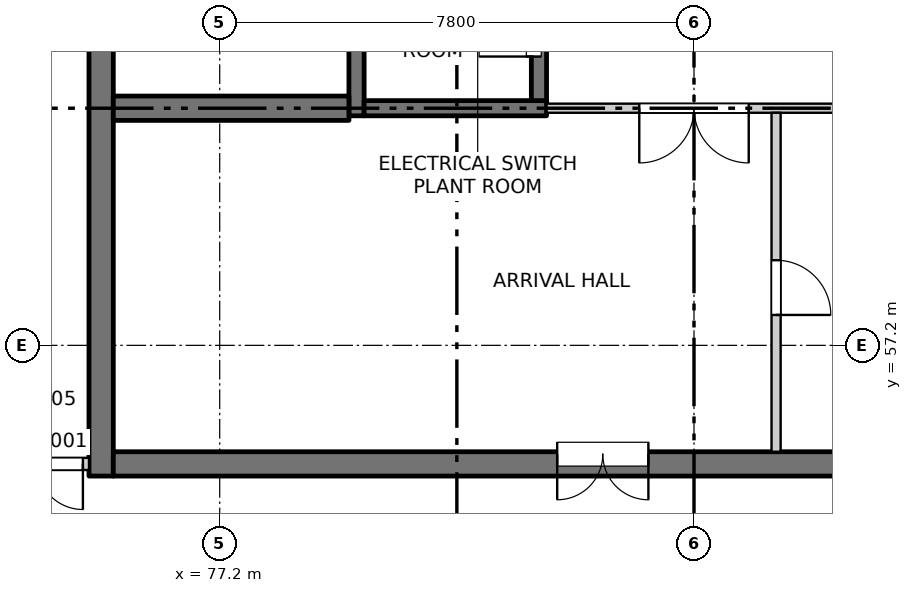
"""IFC4 building model, lengths in metres.
Left out: names, types, materials, properties, quantities, classifications, styles, units other than length and angle.
Written with IfcOpenShell. Run it as: python <this file> out.ifc"""

import sys

from ifc_helpers import new_model, si_unit, direction, frame, frame_2d, origin, place, context, subcontext, project, spatial, rectangle, extrude, element, fill, save


model = new_model("IFC4")
c1 = context("Model", 3, precision=1e-05, world=origin(), true_north=direction((0.0, 1.0)))
c2 = subcontext(c1, "Body", "Model", "MODEL_VIEW")
j1 = project(units=[si_unit("LENGTHUNIT", "METRE"), si_unit("PLANEANGLEUNIT", "RADIAN")], contexts=[c1])
p1 = place(None, origin())
s1 = spatial("IfcSite", under=j1, at=p1, CompositionType="ELEMENT")
p2 = place(p1, origin())
s2 = spatial("IfcBuilding", under=s1, at=p2, CompositionType="ELEMENT")
p3 = place(p2, frame((0.0, 0.0, 241.5)))
s3 = spatial("IfcBuildingStorey", under=s2, at=p3, CompositionType="ELEMENT", Elevation=241.5)
p4 = place(p3, frame((75.25, 55.05, -0.3), z_axis=(0.0, 0.0, 1.0), x_axis=(0.0, 1.0, 0.0)))
e1 = element("IfcWall", 1, at=p4, inside=s3, PredefinedType="SOLIDWALL", context=c2, shape_type="SweptSolid", body=[
    extrude(rectangle(XDim=22.25, YDim=0.4, at=frame_2d((11.125, 0.0))), origin(), (0.0, 0.0, 1.0), 4.5),
])
p5 = place(p4, frame((7.4, 0.0, 0.3)))
e2 = element("IfcOpeningElement", 2, at=p5, cuts=e1, PredefinedType="OPENING", context=c2, shape_type="SweptSolid", body=[
    extrude(rectangle(XDim=0.9, YDim=2.1, at=frame_2d((0.45, 1.05))), frame((0.0, 0.21, 0.0), z_axis=(0.0, -1.0, 0.0), x_axis=(1.0, 0.0, 0.0)), (0.0, 0.0, 1.0), 0.42),
])
p6 = place(p4, frame((10.7, 0.0, 0.3)))
e3 = element("IfcOpeningElement", 3, at=p6, cuts=e1, PredefinedType="OPENING", context=c2, shape_type="SweptSolid", body=[
    extrude(rectangle(XDim=0.9, YDim=2.1, at=frame_2d((0.45, 1.05))), frame((0.0, 0.21, 0.0), z_axis=(0.0, -1.0, 0.0), x_axis=(1.0, 0.0, 0.0)), (0.0, 0.0, 1.0), 0.42),
])
p7 = place(p4, frame((15.2, 0.0, 0.3)))
e4 = element("IfcOpeningElement", 4, at=p7, cuts=e1, PredefinedType="OPENING", context=c2, shape_type="SweptSolid", body=[
    extrude(rectangle(XDim=0.9, YDim=2.1, at=frame_2d((0.45, 1.05))), frame((0.0, 0.21, 0.0), z_axis=(0.0, -1.0, 0.0), x_axis=(1.0, 0.0, 0.0)), (0.0, 0.0, 1.0), 0.42),
])
p8 = place(p4, frame((20.0, 0.0, 0.3)))
e5 = element("IfcOpeningElement", 5, at=p8, cuts=e1, PredefinedType="OPENING", context=c2, shape_type="SweptSolid", body=[
    extrude(rectangle(XDim=0.9, YDim=2.1, at=frame_2d((0.45, 1.05))), frame((0.0, 0.21, 0.0), z_axis=(0.0, -1.0, 0.0), x_axis=(1.0, 0.0, 0.0)), (0.0, 0.0, 1.0), 0.42),
])
p9 = place(p3, frame((75.45, 55.25, -0.3), z_axis=(0.0, 0.0, 1.0), x_axis=(1.0, 0.0, 0.0)))
e6 = element("IfcWall", 6, at=p9, inside=s3, PredefinedType="SOLIDWALL", context=c2, shape_type="SweptSolid", body=[
    extrude(rectangle(XDim=19.1, YDim=0.4, at=frame_2d((9.55, 0.0))), origin(), (0.0, 0.0, 1.0), 4.5),
])
p10 = place(p9, frame((7.3, 0.0, 0.3)))
e7 = element("IfcOpeningElement", 7, at=p10, cuts=e6, PredefinedType="OPENING", context=c2, shape_type="SweptSolid", body=[
    extrude(rectangle(XDim=1.5, YDim=2.1, at=frame_2d((0.75, 1.05))), frame((0.0, 0.21, 0.0), z_axis=(0.0, -1.0, 0.0), x_axis=(1.0, 0.0, 0.0)), (0.0, 0.0, 1.0), 0.42),
])
p11 = place(p3, frame((79.45, 60.975, -0.3), z_axis=(0.0, 0.0, 1.0), x_axis=(0.0, 1.0, 0.0)))
e8 = element("IfcWall", 8, at=p11, inside=s3, PredefinedType="SOLIDWALL", context=c2, shape_type="SweptSolid", body=[
    extrude(rectangle(XDim=16.325, YDim=0.25, at=frame_2d((8.163, 0.0))), origin(), (0.0, 0.0, 1.0), 4.5),
])
p12 = place(p3, frame((79.575, 61.1, -0.3), z_axis=(0.0, 0.0, 1.0), x_axis=(1.0, 0.0, 0.0)))
e9 = element("IfcWall", 9, at=p12, inside=s3, PredefinedType="SOLIDWALL", context=c2, shape_type="SweptSolid", body=[
    extrude(rectangle(XDim=3.0, YDim=0.25, at=frame_2d((1.5, 0.0))), origin(), (0.0, 0.0, 1.0), 4.5),
])
p13 = place(p3, frame((82.45, 61.225, -0.3), z_axis=(0.0, 0.0, 1.0), x_axis=(0.0, 1.0, 0.0)))
e10 = element("IfcWall", 10, at=p13, inside=s3, PredefinedType="SOLIDWALL", context=c2, shape_type="SweptSolid", body=[
    extrude(rectangle(XDim=2.35, YDim=0.25, at=frame_2d((1.175, 0.0))), origin(), (0.0, 0.0, 1.0), 4.5),
])
p14 = place(p13, frame((0.725, 0.0, 0.3)))
e11 = element("IfcOpeningElement", 11, at=p14, cuts=e10, PredefinedType="OPENING", context=c2, shape_type="SweptSolid", body=[
    extrude(rectangle(XDim=0.9, YDim=2.1, at=frame_2d((0.45, 1.05))), frame((0.0, 0.135, 0.0), z_axis=(0.0, -1.0, 0.0), x_axis=(1.0, 0.0, 0.0)), (0.0, 0.0, 1.0), 0.27),
])
p15 = place(p3, frame((75.45, 61.1, -0.3), z_axis=(0.0, 0.0, 1.0), x_axis=(1.0, 0.0, 0.0)))
e12 = element("IfcWall", 12, at=p15, inside=s3, PredefinedType="SOLIDWALL", context=c2, shape_type="SweptSolid", body=[
    extrude(rectangle(XDim=3.875, YDim=0.4, at=frame_2d((1.938, 0.0))), origin(), (0.0, 0.0, 1.0), 4.5),
])
p16 = place(p3, frame((73.2, 55.25, 0.0), z_axis=(0.0, 0.0, 1.0), x_axis=(1.0, 0.0, 0.0)))
e13 = element("IfcWall", 13, at=p16, inside=s3, PredefinedType="PARTITIONING", context=c2, shape_type="SweptSolid", body=[
    extrude(rectangle(XDim=1.85, YDim=0.2, at=frame_2d((0.925, 0.0))), origin(), (0.0, 0.0, 1.0), 4.2),
])
p17 = place(p16, frame((0.25, 0.0, 0.0)))
e14 = element("IfcOpeningElement", 14, at=p17, cuts=e13, PredefinedType="OPENING", context=c2, shape_type="SweptSolid", body=[
    extrude(rectangle(XDim=1.5, YDim=2.1, at=frame_2d((0.75, 1.05))), frame((0.0, 0.11, 0.0), z_axis=(0.0, -1.0, 0.0), x_axis=(1.0, 0.0, 0.0)), (0.0, 0.0, 1.0), 0.22),
])
p18 = place(p3, frame((82.575, 61.1, 0.0), z_axis=(0.0, 0.0, 1.0), x_axis=(1.0, 0.0, 0.0)))
e15 = element("IfcWall", 15, at=p18, inside=s3, PredefinedType="PARTITIONING", context=c2, shape_type="SweptSolid", body=[
    extrude(rectangle(XDim=4.85, YDim=0.15, at=frame_2d((2.425, 0.0))), origin(), (0.0, 0.0, 1.0), 4.2),
])
p19 = place(p18, frame((1.525, 0.0, 0.0)))
e16 = element("IfcOpeningElement", 16, at=p19, cuts=e15, PredefinedType="OPENING", context=c2, shape_type="SweptSolid", body=[
    extrude(rectangle(XDim=1.8, YDim=2.1, at=frame_2d((0.9, 1.05))), frame((0.0, 0.085, 0.0), z_axis=(0.0, -1.0, 0.0), x_axis=(1.0, 0.0, 0.0)), (0.0, 0.0, 1.0), 0.17),
])
p20 = place(p3, frame((86.35, 55.45, 0.0), z_axis=(0.0, 0.0, 1.0), x_axis=(0.0, 1.0, 0.0)))
e17 = element("IfcWall", 17, at=p20, inside=s3, PredefinedType="PARTITIONING", context=c2, shape_type="SweptSolid", body=[
    extrude(rectangle(XDim=5.575, YDim=0.15, at=frame_2d((2.788, 0.0))), origin(), (0.0, 0.0, 1.0), 4.2),
])
p21 = place(p20, frame((2.25, 0.0, 0.0)))
e18 = element("IfcOpeningElement", 18, at=p21, cuts=e17, PredefinedType="OPENING", context=c2, shape_type="SweptSolid", body=[
    extrude(rectangle(XDim=0.9, YDim=2.1, at=frame_2d((0.45, 1.05))), frame((0.0, 0.085, 0.0), z_axis=(0.0, -1.0, 0.0), x_axis=(1.0, 0.0, 0.0)), (0.0, 0.0, 1.0), 0.17),
])
p22 = place(p17, origin())
e19 = element("IfcDoor", 19, at=p22, inside=s3, OperationType="DOUBLE_DOOR_SINGLE_SWING", PredefinedType="DOOR", context=c2, shape_type="SweptSolid", body=[
    extrude(rectangle(XDim=1.5, YDim=2.1, at=frame_2d((0.75, 1.05))), frame((0.0, 0.025, 0.0), z_axis=(0.0, -1.0, 0.0), x_axis=(1.0, 0.0, 0.0)), (0.0, 0.0, 1.0), 0.05),
])
fill(e14, e19)
p23 = place(p10, origin())
e20 = element("IfcDoor", 20, at=p23, inside=s3, OperationType="DOUBLE_DOOR_SINGLE_SWING", PredefinedType="DOOR", context=c2, shape_type="SweptSolid", body=[
    extrude(rectangle(XDim=1.5, YDim=2.1, at=frame_2d((0.75, 1.05))), frame((0.0, 0.185, 0.0), z_axis=(0.0, -1.0, 0.0), x_axis=(1.0, 0.0, 0.0)), (0.0, 0.0, 1.0), 0.05),
])
fill(e7, e20)
p24 = place(p21, origin())
e21 = element("IfcDoor", 21, at=p24, inside=s3, OperationType="SINGLE_SWING_RIGHT", PredefinedType="DOOR", context=c2, shape_type="SweptSolid", body=[
    extrude(rectangle(XDim=0.9, YDim=2.1, at=frame_2d((0.45, 1.05))), frame((0.0, 0.025, 0.0), z_axis=(0.0, -1.0, 0.0), x_axis=(1.0, 0.0, 0.0)), (0.0, 0.0, 1.0), 0.05),
])
fill(e18, e21)
p25 = place(p19, origin())
e22 = element("IfcDoor", 22, at=p25, inside=s3, OperationType="DOUBLE_DOOR_SINGLE_SWING", PredefinedType="DOOR", context=c2, shape_type="SweptSolid", body=[
    extrude(rectangle(XDim=1.8, YDim=2.1, at=frame_2d((0.9, 1.05))), frame((0.0, 0.025, 0.0), z_axis=(0.0, -1.0, 0.0), x_axis=(1.0, 0.0, 0.0)), (0.0, 0.0, 1.0), 0.05),
])
fill(e16, e22)
p26 = place(p14, origin())
e23 = element("IfcDoor", 23, at=p26, inside=s3, OperationType="SINGLE_SWING_LEFT", PredefinedType="DOOR", context=c2, shape_type="SweptSolid", body=[
    extrude(rectangle(XDim=0.9, YDim=2.1, at=frame_2d((0.45, 1.05))), frame((0.0, 0.11, 0.0), z_axis=(0.0, -1.0, 0.0), x_axis=(1.0, 0.0, 0.0)), (0.0, 0.0, 1.0), 0.05),
])
fill(e11, e23)
save(model, sys.argv[1])
